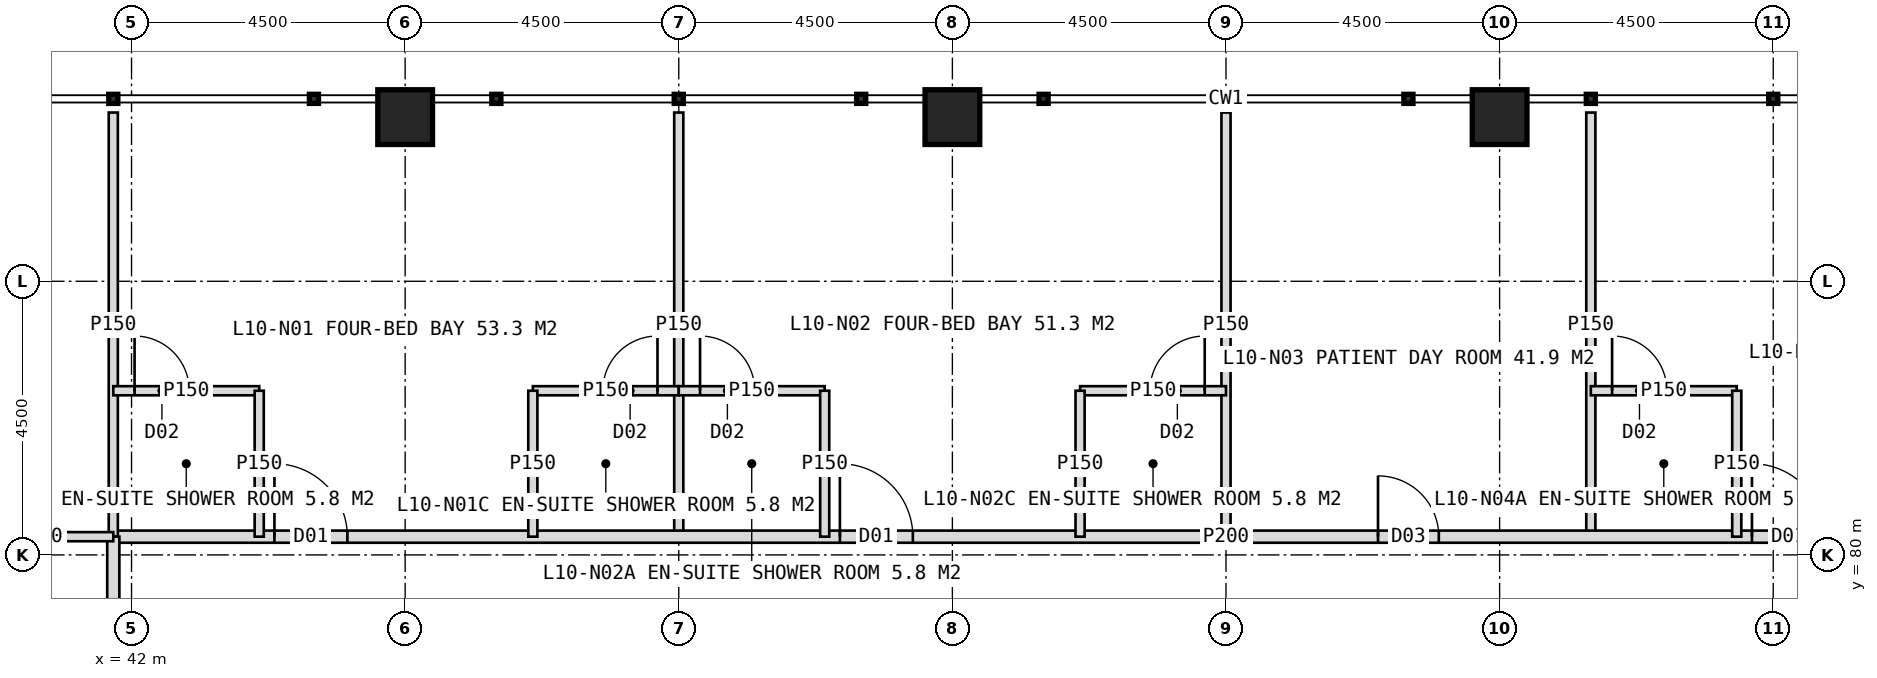
"""IFC4 building model, lengths in metres.
Left out: names, types, materials, properties, quantities, classifications, styles, units other than length and angle.
Written with IfcOpenShell. Run it as: python <this file> out.ifc"""

import sys

from ifc_helpers import new_model, si_unit, direction, frame, frame_2d, origin, origin_2d, place, context, subcontext, project, spatial, rectangle, hollow_rectangle, extrude, element, fill, save


model = new_model("IFC4")
c1 = context("Model", 3, precision=1e-05, world=origin(), true_north=direction((0.0, 1.0)))
c2 = subcontext(c1, "Body", "Model", "MODEL_VIEW")
j1 = project(units=[si_unit("LENGTHUNIT", "METRE"), si_unit("PLANEANGLEUNIT", "RADIAN")], contexts=[c1])
p1 = place(None, origin())
s1 = spatial("IfcSite", under=j1, at=p1, CompositionType="ELEMENT")
p2 = place(p1, origin())
s2 = spatial("IfcBuilding", under=s1, at=p2, CompositionType="ELEMENT")
p3 = place(p2, frame((0.0, 0.0, 47.0)))
s3 = spatial("IfcBuildingStorey", under=s2, at=p3, CompositionType="ELEMENT", Elevation=47.0)
for number, where, z_axis, x_axis in (
    (1, (46.5, 87.2, 0.0), (0.0, 0.0, 1.0), (1.0, 0.0, 0.0)),
    (2, (55.5, 87.2, 0.0), (0.0, 0.0, 1.0), (1.0, 0.0, 0.0)),
    (3, (64.5, 87.2, 0.0), (0.0, 0.0, 1.0), (1.0, 0.0, 0.0)),
):
    element("IfcColumn", number, at=place(p3, frame(where, z_axis=z_axis, x_axis=x_axis)), inside=s3, PredefinedType="COLUMN", context=c2, shape_type="SweptSolid", body=[
        extrude(hollow_rectangle(XDim=0.9, YDim=0.9, WallThickness=0.08, at=origin_2d()), origin(), (0.0, 0.0, 1.0), 4.0),
    ])
p4 = place(p3, frame((51.0, 80.3, 0.0), z_axis=(0.0, 0.0, 1.0), x_axis=(0.0, 1.0, 0.0)))
e4 = element("IfcWall", 4, at=p4, inside=s3, PredefinedType="PARTITIONING", context=c2, shape_type="SweptSolid", body=[
    extrude(rectangle(XDim=6.975, YDim=0.15, at=frame_2d((3.487, 0.0))), origin(), (0.0, 0.0, 1.0), 3.75),
])
p5 = place(p3, frame((60.0, 80.3, 0.0), z_axis=(0.0, 0.0, 1.0), x_axis=(0.0, 1.0, 0.0)))
e5 = element("IfcWall", 5, at=p5, inside=s3, PredefinedType="PARTITIONING", context=c2, shape_type="SweptSolid", body=[
    extrude(rectangle(XDim=6.975, YDim=0.15, at=frame_2d((3.487, 0.0))), origin(), (0.0, 0.0, 1.0), 2.75),
])
p6 = place(p3, frame((66.0, 80.3, 0.0), z_axis=(0.0, 0.0, 1.0), x_axis=(0.0, 1.0, 0.0)))
e6 = element("IfcWall", 6, at=p6, inside=s3, PredefinedType="PARTITIONING", context=c2, shape_type="SweptSolid", body=[
    extrude(rectangle(XDim=6.975, YDim=0.15, at=frame_2d((3.487, 0.0))), origin(), (0.0, 0.0, 1.0), 3.75),
])
p7 = place(p3, frame((41.7, 80.3, 0.0), z_axis=(0.0, 0.0, 1.0), x_axis=(1.0, 0.0, 0.0)))
e7 = element("IfcWall", 7, at=p7, inside=s3, PredefinedType="PARTITIONING", context=c2, shape_type="SweptSolid", body=[
    extrude(rectangle(XDim=36.6, YDim=0.2, at=frame_2d((18.3, 0.0))), origin(), (0.0, 0.0, 1.0), 3.75),
])
p8 = place(p7, frame((2.65, 0.0, 0.0)))
e8 = element("IfcOpeningElement", 8, at=p8, cuts=e7, PredefinedType="OPENING", context=c2, shape_type="SweptSolid", body=[
    extrude(rectangle(XDim=1.2, YDim=2.2, at=frame_2d((0.6, 1.1))), frame((0.0, 0.11, 0.0), z_axis=(0.0, -1.0, 0.0), x_axis=(1.0, 0.0, 0.0)), (0.0, 0.0, 1.0), 0.22),
])
p9 = place(p7, frame((11.95, 0.0, 0.0)))
e9 = element("IfcOpeningElement", 9, at=p9, cuts=e7, PredefinedType="OPENING", context=c2, shape_type="SweptSolid", body=[
    extrude(rectangle(XDim=1.2, YDim=2.2, at=frame_2d((0.6, 1.1))), frame((0.0, 0.11, 0.0), z_axis=(0.0, -1.0, 0.0), x_axis=(1.0, 0.0, 0.0)), (0.0, 0.0, 1.0), 0.22),
])
p10 = place(p7, frame((20.8, 0.0, 0.0)))
e10 = element("IfcOpeningElement", 10, at=p10, cuts=e7, PredefinedType="OPENING", context=c2, shape_type="SweptSolid", body=[
    extrude(rectangle(XDim=1.0, YDim=2.1, at=frame_2d((0.5, 1.05))), frame((0.0, 0.11, 0.0), z_axis=(0.0, -1.0, 0.0), x_axis=(1.0, 0.0, 0.0)), (0.0, 0.0, 1.0), 0.22),
])
p11 = place(p7, frame((26.95, 0.0, 0.0)))
e11 = element("IfcOpeningElement", 11, at=p11, cuts=e7, PredefinedType="OPENING", context=c2, shape_type="SweptSolid", body=[
    extrude(rectangle(XDim=1.2, YDim=2.2, at=frame_2d((0.6, 1.1))), frame((0.0, 0.11, 0.0), z_axis=(0.0, -1.0, 0.0), x_axis=(1.0, 0.0, 0.0)), (0.0, 0.0, 1.0), 0.22),
])
p12 = place(p3, frame((41.7, 80.3, 0.0), z_axis=(0.0, 0.0, 1.0), x_axis=(0.0, 1.0, 0.0)))
e12 = element("IfcWall", 12, at=p12, inside=s3, PredefinedType="PARTITIONING", context=c2, shape_type="SweptSolid", body=[
    extrude(rectangle(XDim=6.975, YDim=0.15, at=frame_2d((3.487, 0.0))), origin(), (0.0, 0.0, 1.0), 3.75),
])
p13 = place(p3, frame((41.7, 82.7, 0.0), z_axis=(0.0, 0.0, 1.0), x_axis=(1.0, 0.0, 0.0)))
e13 = element("IfcWall", 13, at=p13, inside=s3, PredefinedType="PARTITIONING", context=c2, shape_type="SweptSolid", body=[
    extrude(rectangle(XDim=2.4, YDim=0.15, at=frame_2d((1.2, 0.0))), origin(), (0.0, 0.0, 1.0), 2.95),
])
p14 = place(p13, frame((0.35, 0.0, 0.0)))
e14 = element("IfcOpeningElement", 14, at=p14, cuts=e13, PredefinedType="OPENING", context=c2, shape_type="SweptSolid", body=[
    extrude(rectangle(XDim=0.9, YDim=2.1, at=frame_2d((0.45, 1.05))), frame((0.0, 0.085, 0.0), z_axis=(0.0, -1.0, 0.0), x_axis=(1.0, 0.0, 0.0)), (0.0, 0.0, 1.0), 0.17),
])
p15 = place(p3, frame((44.1, 80.3, 0.0), z_axis=(0.0, 0.0, 1.0), x_axis=(0.0, 1.0, 0.0)))
e15 = element("IfcWall", 15, at=p15, inside=s3, PredefinedType="PARTITIONING", context=c2, shape_type="SweptSolid", body=[
    extrude(rectangle(XDim=2.4, YDim=0.15, at=frame_2d((1.2, 0.0))), origin(), (0.0, 0.0, 1.0), 3.75),
])
p16 = place(p3, frame((48.6, 82.7, 0.0), z_axis=(0.0, 0.0, 1.0), x_axis=(1.0, 0.0, 0.0)))
e16 = element("IfcWall", 16, at=p16, inside=s3, PredefinedType="PARTITIONING", context=c2, shape_type="SweptSolid", body=[
    extrude(rectangle(XDim=2.4, YDim=0.15, at=frame_2d((1.2, 0.0))), origin(), (0.0, 0.0, 1.0), 3.75),
])
p17 = place(p16, frame((1.15, 0.0, 0.0)))
e17 = element("IfcOpeningElement", 17, at=p17, cuts=e16, PredefinedType="OPENING", context=c2, shape_type="SweptSolid", body=[
    extrude(rectangle(XDim=0.9, YDim=2.1, at=frame_2d((0.45, 1.05))), frame((0.0, 0.085, 0.0), z_axis=(0.0, -1.0, 0.0), x_axis=(1.0, 0.0, 0.0)), (0.0, 0.0, 1.0), 0.17),
])
p18 = place(p3, frame((48.6, 80.3, 0.0), z_axis=(0.0, 0.0, 1.0), x_axis=(0.0, 1.0, 0.0)))
e18 = element("IfcWall", 18, at=p18, inside=s3, PredefinedType="PARTITIONING", context=c2, shape_type="SweptSolid", body=[
    extrude(rectangle(XDim=2.4, YDim=0.15, at=frame_2d((1.2, 0.0))), origin(), (0.0, 0.0, 1.0), 3.75),
])
p19 = place(p3, frame((51.0, 82.7, 0.0), z_axis=(0.0, 0.0, 1.0), x_axis=(1.0, 0.0, 0.0)))
e19 = element("IfcWall", 19, at=p19, inside=s3, PredefinedType="PARTITIONING", context=c2, shape_type="SweptSolid", body=[
    extrude(rectangle(XDim=2.4, YDim=0.15, at=frame_2d((1.2, 0.0))), origin(), (0.0, 0.0, 1.0), 3.75),
])
p20 = place(p19, frame((0.35, 0.0, 0.0)))
e20 = element("IfcOpeningElement", 20, at=p20, cuts=e19, PredefinedType="OPENING", context=c2, shape_type="SweptSolid", body=[
    extrude(rectangle(XDim=0.9, YDim=2.1, at=frame_2d((0.45, 1.05))), frame((0.0, 0.085, 0.0), z_axis=(0.0, -1.0, 0.0), x_axis=(1.0, 0.0, 0.0)), (0.0, 0.0, 1.0), 0.17),
])
p21 = place(p3, frame((53.4, 80.3, 0.0), z_axis=(0.0, 0.0, 1.0), x_axis=(0.0, 1.0, 0.0)))
e21 = element("IfcWall", 21, at=p21, inside=s3, PredefinedType="PARTITIONING", context=c2, shape_type="SweptSolid", body=[
    extrude(rectangle(XDim=2.4, YDim=0.15, at=frame_2d((1.2, 0.0))), origin(), (0.0, 0.0, 1.0), 3.75),
])
p22 = place(p3, frame((57.6, 82.7, 0.0), z_axis=(0.0, 0.0, 1.0), x_axis=(1.0, 0.0, 0.0)))
e22 = element("IfcWall", 22, at=p22, inside=s3, PredefinedType="PARTITIONING", context=c2, shape_type="SweptSolid", body=[
    extrude(rectangle(XDim=2.4, YDim=0.15, at=frame_2d((1.2, 0.0))), origin(), (0.0, 0.0, 1.0), 3.75),
])
p23 = place(p22, frame((1.15, 0.0, 0.0)))
e23 = element("IfcOpeningElement", 23, at=p23, cuts=e22, PredefinedType="OPENING", context=c2, shape_type="SweptSolid", body=[
    extrude(rectangle(XDim=0.9, YDim=2.1, at=frame_2d((0.45, 1.05))), frame((0.0, 0.085, 0.0), z_axis=(0.0, -1.0, 0.0), x_axis=(1.0, 0.0, 0.0)), (0.0, 0.0, 1.0), 0.17),
])
p24 = place(p3, frame((57.6, 80.3, 0.0), z_axis=(0.0, 0.0, 1.0), x_axis=(0.0, 1.0, 0.0)))
e24 = element("IfcWall", 24, at=p24, inside=s3, PredefinedType="PARTITIONING", context=c2, shape_type="SweptSolid", body=[
    extrude(rectangle(XDim=2.4, YDim=0.15, at=frame_2d((1.2, 0.0))), origin(), (0.0, 0.0, 1.0), 3.75),
])
p25 = place(p3, frame((66.0, 82.7, 0.0), z_axis=(0.0, 0.0, 1.0), x_axis=(1.0, 0.0, 0.0)))
e25 = element("IfcWall", 25, at=p25, inside=s3, PredefinedType="PARTITIONING", context=c2, shape_type="SweptSolid", body=[
    extrude(rectangle(XDim=2.4, YDim=0.15, at=frame_2d((1.2, 0.0))), origin(), (0.0, 0.0, 1.0), 3.75),
])
p26 = place(p25, frame((0.35, 0.0, 0.0)))
e26 = element("IfcOpeningElement", 26, at=p26, cuts=e25, PredefinedType="OPENING", context=c2, shape_type="SweptSolid", body=[
    extrude(rectangle(XDim=0.9, YDim=2.1, at=frame_2d((0.45, 1.05))), frame((0.0, 0.085, 0.0), z_axis=(0.0, -1.0, 0.0), x_axis=(1.0, 0.0, 0.0)), (0.0, 0.0, 1.0), 0.17),
])
p27 = place(p3, frame((68.4, 80.3, 0.0), z_axis=(0.0, 0.0, 1.0), x_axis=(0.0, 1.0, 0.0)))
e27 = element("IfcWall", 27, at=p27, inside=s3, PredefinedType="PARTITIONING", context=c2, shape_type="SweptSolid", body=[
    extrude(rectangle(XDim=2.4, YDim=0.15, at=frame_2d((1.2, 0.0))), origin(), (0.0, 0.0, 1.0), 3.75),
])
p28 = place(p3, frame((41.7, 43.7, 0.0), z_axis=(0.0, 0.0, 1.0), x_axis=(0.0, 1.0, 0.0)))
e28 = element("IfcWall", 28, at=p28, inside=s3, PredefinedType="PARTITIONING", context=c2, shape_type="SweptSolid", body=[
    extrude(rectangle(XDim=36.6, YDim=0.2, at=frame_2d((18.3, 0.0))), origin(), (0.0, 0.0, 1.0), 3.75),
])
p29 = place(p28, frame((2.65, 0.0, 0.0)))
e29 = element("IfcOpeningElement", 29, at=p29, cuts=e28, PredefinedType="OPENING", context=c2, shape_type="SweptSolid", body=[
    extrude(rectangle(XDim=1.2, YDim=2.2, at=frame_2d((0.6, 1.1))), frame((0.0, 0.11, 0.0), z_axis=(0.0, -1.0, 0.0), x_axis=(1.0, 0.0, 0.0)), (0.0, 0.0, 1.0), 0.22),
])
p30 = place(p28, frame((8.95, 0.0, 0.0)))
e30 = element("IfcOpeningElement", 30, at=p30, cuts=e28, PredefinedType="OPENING", context=c2, shape_type="SweptSolid", body=[
    extrude(rectangle(XDim=1.2, YDim=2.2, at=frame_2d((0.6, 1.1))), frame((0.0, 0.11, 0.0), z_axis=(0.0, -1.0, 0.0), x_axis=(1.0, 0.0, 0.0)), (0.0, 0.0, 1.0), 0.22),
])
p31 = place(p28, frame((14.95, 0.0, 0.0)))
e31 = element("IfcOpeningElement", 31, at=p31, cuts=e28, PredefinedType="OPENING", context=c2, shape_type="SweptSolid", body=[
    extrude(rectangle(XDim=1.2, YDim=2.2, at=frame_2d((0.6, 1.1))), frame((0.0, 0.11, 0.0), z_axis=(0.0, -1.0, 0.0), x_axis=(1.0, 0.0, 0.0)), (0.0, 0.0, 1.0), 0.22),
])
p32 = place(p28, frame((20.95, 0.0, 0.0)))
e32 = element("IfcOpeningElement", 32, at=p32, cuts=e28, PredefinedType="OPENING", context=c2, shape_type="SweptSolid", body=[
    extrude(rectangle(XDim=1.2, YDim=2.2, at=frame_2d((0.6, 1.1))), frame((0.0, 0.11, 0.0), z_axis=(0.0, -1.0, 0.0), x_axis=(1.0, 0.0, 0.0)), (0.0, 0.0, 1.0), 0.22),
])
p33 = place(p28, frame((29.95, 0.0, 0.0)))
e33 = element("IfcOpeningElement", 33, at=p33, cuts=e28, PredefinedType="OPENING", context=c2, shape_type="SweptSolid", body=[
    extrude(rectangle(XDim=1.2, YDim=2.2, at=frame_2d((0.6, 1.1))), frame((0.0, 0.11, 0.0), z_axis=(0.0, -1.0, 0.0), x_axis=(1.0, 0.0, 0.0)), (0.0, 0.0, 1.0), 0.22),
])
p34 = place(p3, frame((41.7, 80.3, 0.0), z_axis=(0.0, 0.0, 1.0), x_axis=(-1.0, 0.0, 0.0)))
e34 = element("IfcWall", 34, at=p34, inside=s3, PredefinedType="PARTITIONING", context=c2, shape_type="SweptSolid", body=[
    extrude(rectangle(XDim=2.4, YDim=0.15, at=frame_2d((1.2, 0.0))), origin(), (0.0, 0.0, 1.0), 3.75),
])
p35 = place(p8, origin())
e35 = element("IfcDoor", 35, at=p35, inside=s3, OperationType="SINGLE_SWING_LEFT", PredefinedType="DOOR", context=c2, shape_type="SweptSolid", body=[
    extrude(rectangle(XDim=1.2, YDim=2.2, at=frame_2d((0.6, 1.1))), frame((0.0, 0.025, 0.0), z_axis=(0.0, -1.0, 0.0), x_axis=(1.0, 0.0, 0.0)), (0.0, 0.0, 1.0), 0.05),
])
fill(e8, e35)
p36 = place(p14, origin())
e36 = element("IfcDoor", 36, at=p36, inside=s3, OperationType="SINGLE_SWING_LEFT", PredefinedType="DOOR", context=c2, shape_type="SweptSolid", body=[
    extrude(rectangle(XDim=0.9, YDim=2.1, at=frame_2d((0.45, 1.05))), frame((0.0, 0.025, 0.0), z_axis=(0.0, -1.0, 0.0), x_axis=(1.0, 0.0, 0.0)), (0.0, 0.0, 1.0), 0.05),
])
fill(e14, e36)
p37 = place(p17, origin())
e37 = element("IfcDoor", 37, at=p37, inside=s3, OperationType="SINGLE_SWING_RIGHT", PredefinedType="DOOR", context=c2, shape_type="SweptSolid", body=[
    extrude(rectangle(XDim=0.9, YDim=2.1, at=frame_2d((0.45, 1.05))), frame((0.0, 0.025, 0.0), z_axis=(0.0, -1.0, 0.0), x_axis=(1.0, 0.0, 0.0)), (0.0, 0.0, 1.0), 0.05),
])
fill(e17, e37)
p38 = place(p9, origin())
e38 = element("IfcDoor", 38, at=p38, inside=s3, OperationType="SINGLE_SWING_LEFT", PredefinedType="DOOR", context=c2, shape_type="SweptSolid", body=[
    extrude(rectangle(XDim=1.2, YDim=2.2, at=frame_2d((0.6, 1.1))), frame((0.0, 0.025, 0.0), z_axis=(0.0, -1.0, 0.0), x_axis=(1.0, 0.0, 0.0)), (0.0, 0.0, 1.0), 0.05),
])
fill(e9, e38)
p39 = place(p20, origin())
e39 = element("IfcDoor", 39, at=p39, inside=s3, OperationType="SINGLE_SWING_LEFT", PredefinedType="DOOR", context=c2, shape_type="SweptSolid", body=[
    extrude(rectangle(XDim=0.9, YDim=2.1, at=frame_2d((0.45, 1.05))), frame((0.0, 0.025, 0.0), z_axis=(0.0, -1.0, 0.0), x_axis=(1.0, 0.0, 0.0)), (0.0, 0.0, 1.0), 0.05),
])
fill(e20, e39)
p40 = place(p23, origin())
e40 = element("IfcDoor", 40, at=p40, inside=s3, OperationType="SINGLE_SWING_RIGHT", PredefinedType="DOOR", context=c2, shape_type="SweptSolid", body=[
    extrude(rectangle(XDim=0.9, YDim=2.1, at=frame_2d((0.45, 1.05))), frame((0.0, 0.025, 0.0), z_axis=(0.0, -1.0, 0.0), x_axis=(1.0, 0.0, 0.0)), (0.0, 0.0, 1.0), 0.05),
])
fill(e23, e40)
p41 = place(p10, origin())
e41 = element("IfcDoor", 41, at=p41, inside=s3, OperationType="SINGLE_SWING_LEFT", PredefinedType="DOOR", context=c2, shape_type="SweptSolid", body=[
    extrude(rectangle(XDim=1.0, YDim=2.1, at=frame_2d((0.5, 1.05))), frame((0.0, 0.025, 0.0), z_axis=(0.0, -1.0, 0.0), x_axis=(1.0, 0.0, 0.0)), (0.0, 0.0, 1.0), 0.05),
])
fill(e10, e41)
p42 = place(p11, origin())
e42 = element("IfcDoor", 42, at=p42, inside=s3, OperationType="SINGLE_SWING_LEFT", PredefinedType="DOOR", context=c2, shape_type="SweptSolid", body=[
    extrude(rectangle(XDim=1.2, YDim=2.2, at=frame_2d((0.6, 1.1))), frame((0.0, 0.025, 0.0), z_axis=(0.0, -1.0, 0.0), x_axis=(1.0, 0.0, 0.0)), (0.0, 0.0, 1.0), 0.05),
])
fill(e11, e42)
p43 = place(p26, origin())
e43 = element("IfcDoor", 43, at=p43, inside=s3, OperationType="SINGLE_SWING_LEFT", PredefinedType="DOOR", context=c2, shape_type="SweptSolid", body=[
    extrude(rectangle(XDim=0.9, YDim=2.1, at=frame_2d((0.45, 1.05))), frame((0.0, 0.025, 0.0), z_axis=(0.0, -1.0, 0.0), x_axis=(1.0, 0.0, 0.0)), (0.0, 0.0, 1.0), 0.05),
])
fill(e26, e43)
save(model, sys.argv[1])
